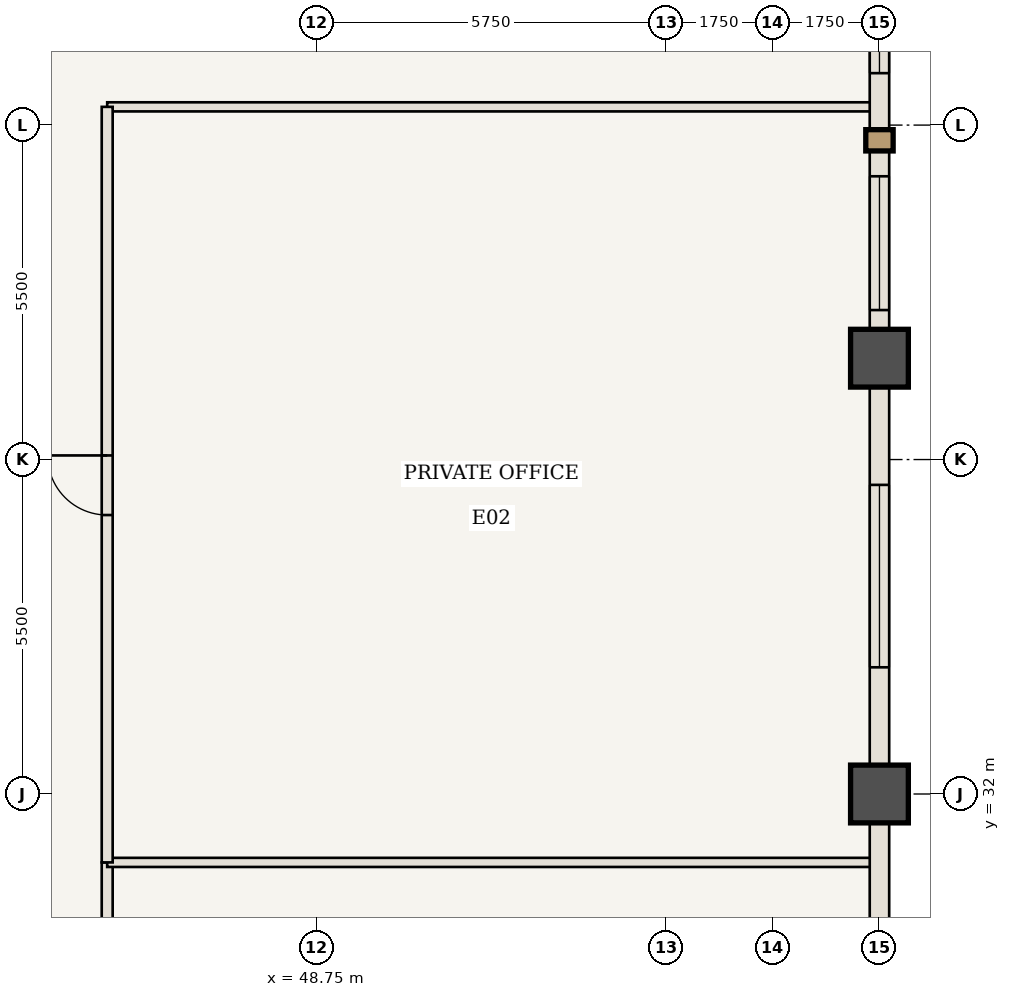
"""IFC4 building model, lengths in metres.
Left out: names, types, materials, properties, quantities, classifications, styles, units other than length and angle.
Written with IfcOpenShell. Run it as: python <this file> out.ifc"""

import sys

from ifc_helpers import new_model, si_unit, direction, frame, frame_2d, origin, origin_2d, place, context, subcontext, project, spatial, rectangle, extrude, element, fill, save


model = new_model("IFC4")
c1 = context("Model", 3, precision=1e-05, world=origin(), true_north=direction((0.0, 1.0)))
c2 = subcontext(c1, "Body", "Model", "MODEL_VIEW")
j1 = project(units=[si_unit("LENGTHUNIT", "METRE"), si_unit("PLANEANGLEUNIT", "RADIAN")], contexts=[c1])
p1 = place(None, origin())
s1 = spatial("IfcSite", under=j1, at=p1, CompositionType="ELEMENT")
p2 = place(p1, origin())
s2 = spatial("IfcBuilding", under=s1, at=p2, CompositionType="ELEMENT")
p3 = place(p2, frame((0.0, 0.0, 137.55)))
s3 = spatial("IfcBuildingStorey", under=s2, at=p3, CompositionType="ELEMENT", Elevation=137.55)
for number, where, z_axis, x_axis in (
    (1, (58.0, 32.0, 0.0), (0.0, 0.0, 1.0), (1.0, 0.0, 0.0)),
    (2, (58.0, 39.167, 0.0), (0.0, 0.0, 1.0), (1.0, 0.0, 0.0)),
):
    element("IfcColumn", number, at=place(p3, frame(where, z_axis=z_axis, x_axis=x_axis)), inside=s3, PredefinedType="COLUMN", context=c2, shape_type="SweptSolid", body=[
        extrude(rectangle(XDim=0.95, YDim=0.95, at=origin_2d()), origin(), (0.0, 0.0, 1.0), 3.85),
    ])
p4 = place(p3, frame((45.3, 43.3, 0.0), z_axis=(0.0, 0.0, 1.0), x_axis=(1.0, 0.0, 0.0)))
e3 = element("IfcWall", 3, at=p4, inside=s3, PredefinedType="STANDARD", context=c2, shape_type="SweptSolid", body=[
    extrude(rectangle(XDim=12.64, YDim=0.15, at=frame_2d((6.32, 0.0))), origin(), (0.0, 0.0, 1.0), 3.065),
])
p5 = place(p3, frame((45.3, 20.7, 0.0), z_axis=(0.0, 0.0, 1.0), x_axis=(0.0, 1.0, 0.0)))
e4 = element("IfcWall", 4, at=p5, inside=s3, PredefinedType="STANDARD", context=c2, shape_type="SweptSolid", body=[
    extrude(rectangle(XDim=10.175, YDim=0.18, at=frame_2d((5.087, 0.0))), origin(), (0.0, 0.0, 1.0), 3.685),
])
p6 = place(p5, frame((4.587, 0.0, 0.0)))
e5 = element("IfcOpeningElement", 5, at=p6, cuts=e4, PredefinedType="OPENING", context=c2, shape_type="SweptSolid", body=[
    extrude(rectangle(XDim=0.98, YDim=2.2, at=frame_2d((0.49, 1.1))), frame((0.0, 0.1, 0.0), z_axis=(0.0, -1.0, 0.0), x_axis=(1.0, 0.0, 0.0)), (0.0, 0.0, 1.0), 0.2),
])
p7 = place(p3, frame((45.3, 30.875, 0.0), z_axis=(0.0, 0.0, 1.0), x_axis=(1.0, 0.0, 0.0)))
e6 = element("IfcWall", 6, at=p7, inside=s3, PredefinedType="STANDARD", context=c2, shape_type="SweptSolid", body=[
    extrude(rectangle(XDim=12.64, YDim=0.15, at=frame_2d((6.32, 0.0))), origin(), (0.0, 0.0, 1.0), 3.685),
])
p8 = place(p3, frame((45.3, 30.875, 0.0), z_axis=(0.0, 0.0, 1.0), x_axis=(0.0, 1.0, 0.0)))
e7 = element("IfcWall", 7, at=p8, inside=s3, PredefinedType="STANDARD", context=c2, shape_type="SweptSolid", body=[
    extrude(rectangle(XDim=12.425, YDim=0.18, at=frame_2d((6.212, 0.0))), origin(), (0.0, 0.0, 1.0), 3.685),
])
p9 = place(p8, frame((5.712, 0.0, 0.0)))
e8 = element("IfcOpeningElement", 8, at=p9, cuts=e7, PredefinedType="OPENING", context=c2, shape_type="SweptSolid", body=[
    extrude(rectangle(XDim=0.98, YDim=2.2, at=frame_2d((0.49, 1.1))), frame((0.0, 0.1, 0.0), z_axis=(0.0, -1.0, 0.0), x_axis=(1.0, 0.0, 0.0)), (0.0, 0.0, 1.0), 0.2),
])
p10 = place(p3, frame((58.0, 32.0, 0.0), z_axis=(0.0, 0.0, 1.0), x_axis=(0.0, -1.0, 0.0)))
e9 = element("IfcWall", 9, at=p10, inside=s3, PredefinedType="USERDEFINED", context=c2, shape_type="SweptSolid", body=[
    extrude(rectangle(XDim=7.167, YDim=0.32, at=frame_2d((3.583, 0.0))), origin(), (0.0, 0.0, 1.0), 2.885),
])
p11 = place(p10, frame((2.483, 0.0, 0.85)))
e10 = element("IfcOpeningElement", 10, at=p11, cuts=e9, PredefinedType="OPENING", context=c2, shape_type="SweptSolid", body=[
    extrude(rectangle(XDim=3.0, YDim=1.835, at=frame_2d((1.5, 0.917))), frame((0.0, 0.17, 0.0), z_axis=(0.0, -1.0, 0.0), x_axis=(1.0, 0.0, 0.0)), (0.0, 0.0, 1.0), 0.34),
])
p12 = place(p3, frame((58.0, 39.167, 0.0), z_axis=(0.0, 0.0, 1.0), x_axis=(0.0, -1.0, 0.0)))
e11 = element("IfcWall", 11, at=p12, inside=s3, PredefinedType="USERDEFINED", context=c2, shape_type="SweptSolid", body=[
    extrude(rectangle(XDim=7.167, YDim=0.32, at=frame_2d((3.583, 0.0))), origin(), (0.0, 0.0, 1.0), 2.885),
])
p13 = place(p12, frame((2.083, 0.0, 0.85)))
e12 = element("IfcOpeningElement", 12, at=p13, cuts=e11, PredefinedType="OPENING", context=c2, shape_type="SweptSolid", body=[
    extrude(rectangle(XDim=3.0, YDim=1.835, at=frame_2d((1.5, 0.917))), frame((0.0, 0.17, 0.0), z_axis=(0.0, -1.0, 0.0), x_axis=(1.0, 0.0, 0.0)), (0.0, 0.0, 1.0), 0.34),
])
p14 = place(p3, frame((58.0, 46.333, 0.0), z_axis=(0.0, 0.0, 1.0), x_axis=(0.0, -1.0, 0.0)))
e13 = element("IfcWall", 13, at=p14, inside=s3, PredefinedType="USERDEFINED", context=c2, shape_type="SweptSolid", body=[
    extrude(rectangle(XDim=7.167, YDim=0.32, at=frame_2d((3.583, 0.0))), origin(), (0.0, 0.0, 1.0), 2.885),
])
p15 = place(p14, frame((0.879, 0.0, 0.85)))
e14 = element("IfcOpeningElement", 14, at=p15, cuts=e13, PredefinedType="OPENING", context=c2, shape_type="SweptSolid", body=[
    extrude(rectangle(XDim=1.6, YDim=1.835, at=frame_2d((0.8, 0.917))), frame((0.0, 0.17, 0.0), z_axis=(0.0, -1.0, 0.0), x_axis=(1.0, 0.0, 0.0)), (0.0, 0.0, 1.0), 0.34),
])
p16 = place(p14, frame((4.175, 0.0, 0.85)))
e15 = element("IfcOpeningElement", 15, at=p16, cuts=e13, PredefinedType="OPENING", context=c2, shape_type="SweptSolid", body=[
    extrude(rectangle(XDim=2.2, YDim=1.835, at=frame_2d((1.1, 0.917))), frame((0.0, 0.17, 0.0), z_axis=(0.0, -1.0, 0.0), x_axis=(1.0, 0.0, 0.0)), (0.0, 0.0, 1.0), 0.34),
])
p17 = place(p9, origin())
e16 = element("IfcDoor", 16, at=p17, inside=s3, OperationType="SINGLE_SWING_RIGHT", PredefinedType="DOOR", context=c2, shape_type="SweptSolid", body=[
    extrude(rectangle(XDim=0.98, YDim=2.2, at=frame_2d((0.49, 1.1))), frame((0.0, 0.025, 0.0), z_axis=(0.0, -1.0, 0.0), x_axis=(1.0, 0.0, 0.0)), (0.0, 0.0, 1.0), 0.05),
])
fill(e8, e16)
p18 = place(p13, origin())
e17 = element("IfcWindow", 17, at=p18, inside=s3, PartitioningType="SINGLE_PANEL", PredefinedType="WINDOW", context=c2, shape_type="SweptSolid", body=[
    extrude(rectangle(XDim=3.0, YDim=1.835, at=frame_2d((1.5, 0.917))), frame((0.0, 0.03, 0.0), z_axis=(0.0, -1.0, 0.0), x_axis=(1.0, 0.0, 0.0)), (0.0, 0.0, 1.0), 0.06),
])
fill(e12, e17)
p19 = place(p15, origin())
e18 = element("IfcWindow", 18, at=p19, inside=s3, PartitioningType="SINGLE_PANEL", PredefinedType="WINDOW", context=c2, shape_type="SweptSolid", body=[
    extrude(rectangle(XDim=1.6, YDim=1.835, at=frame_2d((0.8, 0.917))), frame((0.0, 0.03, 0.0), z_axis=(0.0, -1.0, 0.0), x_axis=(1.0, 0.0, 0.0)), (0.0, 0.0, 1.0), 0.06),
])
fill(e14, e18)
p20 = place(p16, origin())
e19 = element("IfcWindow", 19, at=p20, inside=s3, PartitioningType="SINGLE_PANEL", PredefinedType="WINDOW", context=c2, shape_type="SweptSolid", body=[
    extrude(rectangle(XDim=2.2, YDim=1.835, at=frame_2d((1.1, 0.917))), frame((0.0, 0.03, 0.0), z_axis=(0.0, -1.0, 0.0), x_axis=(1.0, 0.0, 0.0)), (0.0, 0.0, 1.0), 0.06),
])
fill(e15, e19)
save(model, sys.argv[1])
